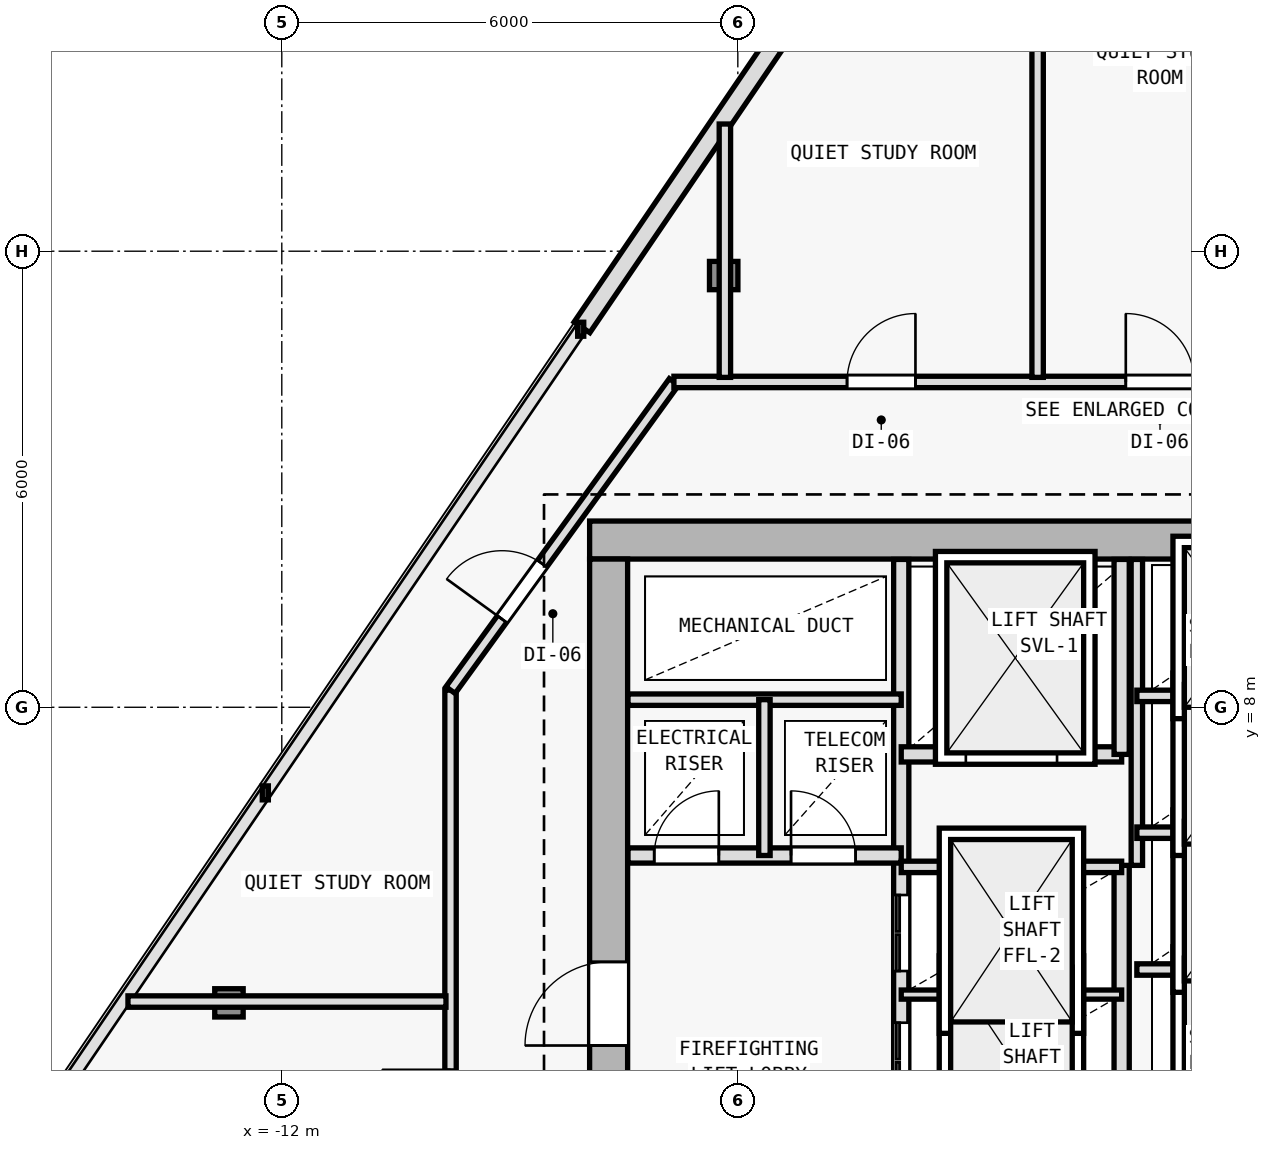
"""IFC4 building model, lengths in metres.
Left out: names, types, materials, properties, quantities, classifications, styles, units other than length and angle.
Written with IfcOpenShell. Run it as: python <this file> out.ifc"""

import sys

from ifc_helpers import new_model, si_unit, direction, frame, frame_2d, origin, origin_2d, place, context, subcontext, project, spatial, rectangle, i_section, extrude, element, fill, save


model = new_model("IFC4")
c1 = context("Model", 3, precision=1e-05, world=origin(), true_north=direction((0.0, 1.0)))
c2 = subcontext(c1, "Body", "Model", "MODEL_VIEW")
j1 = project(units=[si_unit("LENGTHUNIT", "METRE"), si_unit("PLANEANGLEUNIT", "RADIAN")], contexts=[c1])
p1 = place(None, origin())
s1 = spatial("IfcSite", under=j1, at=p1, CompositionType="ELEMENT")
p2 = place(p1, origin())
s2 = spatial("IfcBuilding", under=s1, at=p2, CompositionType="ELEMENT")
p3 = place(p2, frame((0.0, 0.0, 237.9)))
s3 = spatial("IfcBuildingStorey", under=s2, at=p3, CompositionType="ELEMENT", Elevation=237.9)
p4 = place(p3, frame((-7.7, 10.2, 0.0), z_axis=(0.0, 0.0, 1.0), x_axis=(1.0, 0.0, 0.0)))
e1 = element("IfcColumn", 1, at=p4, inside=s3, PredefinedType="COLUMN", context=c2, shape_type="SweptSolid", body=[
    extrude(i_section(OverallWidth=0.398, OverallDepth=0.387, WebThickness=0.013, FlangeThickness=0.022, FilletRadius=0.015, at=origin_2d()), origin(), (0.0, 0.0, 1.0), 3.6),
])
p5 = place(p3, frame((-6.186, 13.68, 0.006), z_axis=(0.008843163607, -0.002516900411, 0.999957730942), x_axis=(0.273743828055, 0.961802639112, 0.0)))
e2 = element("IfcColumn", 2, at=p5, inside=s3, PredefinedType="COLUMN", context=c2, shape_type="SweptSolid", body=[
    extrude(i_section(OverallWidth=0.374, OverallDepth=0.372, WebThickness=0.012, FlangeThickness=0.02, FilletRadius=0.015, at=origin_2d()), origin(), (0.0, 0.0, 1.0), 3.589),
])
p6 = place(p3, frame((-12.695, 4.111, 0.006), z_axis=(0.017003561856, 0.009590008887, 0.99980943715), x_axis=(-0.491253415567, 0.871016694268, 0.0)))
e3 = element("IfcColumn", 3, at=p6, inside=s3, PredefinedType="COLUMN", context=c2, shape_type="SweptSolid", body=[
    extrude(i_section(OverallWidth=0.374, OverallDepth=0.372, WebThickness=0.012, FlangeThickness=0.02, FilletRadius=0.015, at=origin_2d()), origin(), (0.0, 0.0, 1.0), 3.59),
])
p7 = place(p3, frame((-8.05, 12.998, 0.0), z_axis=(0.0, 0.0, 1.0), x_axis=(0.562447281182, 0.826833148762, 0.0)))
e4 = element("IfcWall", 4, at=p7, inside=s3, PredefinedType="SOLIDWALL", context=c2, shape_type="SweptSolid", body=[
    extrude(rectangle(XDim=10.411, YDim=0.25, at=frame_2d((5.205, 0.0))), origin(), (0.0, 0.0, 1.0), 3.28),
])
p8 = place(p7, frame((4.455, 0.0, 0.62)))
e5 = element("IfcOpeningElement", 5, at=p8, cuts=e4, PredefinedType="OPENING", context=c2, shape_type="SweptSolid", body=[
    extrude(rectangle(XDim=1.5, YDim=2.0, at=frame_2d((0.75, 1.0))), frame((0.0, 0.135, 0.0), z_axis=(0.0, -1.0, 0.0), x_axis=(1.0, 0.0, 0.0)), (0.0, 0.0, 1.0), 0.27),
])
p9 = place(p3, frame((7.95, 10.2, 0.0), z_axis=(0.0, 0.0, 1.0), x_axis=(-1.0, 0.0, 0.0)))
e6 = element("IfcWall", 6, at=p9, inside=s3, PredefinedType="SHEAR", context=c2, shape_type="SweptSolid", body=[
    extrude(rectangle(XDim=15.9, YDim=0.5, at=frame_2d((7.95, 0.0))), origin(), (0.0, 0.0, 1.0), 3.28),
])
p10 = place(p9, frame((4.4, 0.0, 0.0)))
e7 = element("IfcOpeningElement", 7, at=p10, cuts=e6, PredefinedType="OPENING", context=c2, shape_type="SweptSolid", body=[
    extrude(rectangle(XDim=1.1, YDim=2.15, at=frame_2d((0.55, 1.075))), frame((0.0, 0.26, 0.0), z_axis=(0.0, -1.0, 0.0), x_axis=(1.0, 0.0, 0.0)), (0.0, 0.0, 1.0), 0.52),
])
p11 = place(p3, frame((-7.7, -9.15, 0.0), z_axis=(0.0, 0.0, 1.0), x_axis=(0.0, 1.0, 0.0)))
e8 = element("IfcWall", 8, at=p11, inside=s3, PredefinedType="SHEAR", context=c2, shape_type="SweptSolid", body=[
    extrude(rectangle(XDim=19.1, YDim=0.5, at=frame_2d((9.55, 0.0))), origin(), (0.0, 0.0, 1.0), 3.28),
])
p12 = place(p11, frame((12.7, 0.0, 0.0)))
e9 = element("IfcOpeningElement", 9, at=p12, cuts=e8, PredefinedType="OPENING", context=c2, shape_type="SweptSolid", body=[
    extrude(rectangle(XDim=1.1, YDim=2.15, at=frame_2d((0.55, 1.075))), frame((0.0, 0.26, 0.0), z_axis=(0.0, -1.0, 0.0), x_axis=(1.0, 0.0, 0.0)), (0.0, 0.0, 1.0), 0.52),
])
p13 = place(p3, frame((-3.85, 1.35, 0.0), z_axis=(0.0, 0.0, 1.0), x_axis=(0.0, 1.0, 0.0)))
e10 = element("IfcWall", 10, at=p13, inside=s3, PredefinedType="SOLIDWALL", context=c2, shape_type="SweptSolid", body=[
    extrude(rectangle(XDim=8.595, YDim=0.2, at=frame_2d((4.297, 0.0))), origin(), (0.0, 0.0, 1.0), 3.28),
])
p14 = place(p13, frame((1.5, 0.0, 0.0)))
e11 = element("IfcOpeningElement", 11, at=p14, cuts=e10, PredefinedType="OPENING", context=c2, shape_type="SweptSolid", body=[
    extrude(rectangle(XDim=1.0, YDim=2.15, at=frame_2d((0.5, 1.075))), frame((0.0, 0.11, 0.0), z_axis=(0.0, -1.0, 0.0), x_axis=(1.0, 0.0, 0.0)), (0.0, 0.0, 1.0), 0.22),
])
p15 = place(p13, frame((3.18, 0.0, 0.0)))
e12 = element("IfcOpeningElement", 12, at=p15, cuts=e10, PredefinedType="OPENING", context=c2, shape_type="SweptSolid", body=[
    extrude(rectangle(XDim=1.0, YDim=2.15, at=frame_2d((0.5, 1.075))), frame((0.0, 0.11, 0.0), z_axis=(0.0, -1.0, 0.0), x_axis=(1.0, 0.0, 0.0)), (0.0, 0.0, 1.0), 0.22),
])
p16 = place(p3, frame((-7.445, 6.05, 0.0), z_axis=(0.0, 0.0, 1.0), x_axis=(1.0, 0.0, 0.0)))
e13 = element("IfcWall", 13, at=p16, inside=s3, PredefinedType="SOLIDWALL", context=c2, shape_type="SweptSolid", body=[
    extrude(rectangle(XDim=3.595, YDim=0.2, at=frame_2d((1.797, 0.0))), origin(), (0.0, 0.0, 1.0), 3.28),
])
p17 = place(p16, frame((0.345, 0.0, 0.0)))
e14 = element("IfcOpeningElement", 14, at=p17, cuts=e13, PredefinedType="OPENING", context=c2, shape_type="SweptSolid", body=[
    extrude(rectangle(XDim=0.85, YDim=2.1, at=frame_2d((0.425, 1.05))), frame((0.0, 0.11, 0.0), z_axis=(0.0, -1.0, 0.0), x_axis=(1.0, 0.0, 0.0)), (0.0, 0.0, 1.0), 0.22),
])
p18 = place(p16, frame((2.145, 0.0, 0.0)))
e15 = element("IfcOpeningElement", 15, at=p18, cuts=e13, PredefinedType="OPENING", context=c2, shape_type="SweptSolid", body=[
    extrude(rectangle(XDim=0.85, YDim=2.1, at=frame_2d((0.425, 1.05))), frame((0.0, 0.11, 0.0), z_axis=(0.0, -1.0, 0.0), x_axis=(1.0, 0.0, 0.0)), (0.0, 0.0, 1.0), 0.22),
])
p19 = place(p3, frame((-7.445, 8.1, 0.0), z_axis=(0.0, 0.0, 1.0), x_axis=(1.0, 0.0, 0.0)))
e16 = element("IfcWall", 16, at=p19, inside=s3, PredefinedType="PARTITIONING", context=c2, shape_type="SweptSolid", body=[
    extrude(rectangle(XDim=3.595, YDim=0.15, at=frame_2d((1.797, 0.0))), origin(), (0.0, 0.0, 1.0), 3.28),
])
p20 = place(p3, frame((-5.65, 6.05, 0.0), z_axis=(0.0, 0.0, 1.0), x_axis=(0.0, 1.0, 0.0)))
e17 = element("IfcWall", 17, at=p20, inside=s3, PredefinedType="PARTITIONING", context=c2, shape_type="SweptSolid", body=[
    extrude(rectangle(XDim=2.05, YDim=0.15, at=frame_2d((1.025, 0.0))), origin(), (0.0, 0.0, 1.0), 3.28),
])
p21 = place(p3, frame((-0.95, 2.65, 0.0), z_axis=(0.0, 0.0, 1.0), x_axis=(0.0, 1.0, 0.0)))
e18 = element("IfcWall", 18, at=p21, inside=s3, PredefinedType="SOLIDWALL", context=c2, shape_type="SweptSolid", body=[
    extrude(rectangle(XDim=3.27, YDim=0.2, at=frame_2d((1.635, 0.0))), origin(), (0.0, 0.0, 1.0), 3.28),
])
p22 = place(p3, frame((-3.85, 4.22, 0.0), z_axis=(0.0, 0.0, 1.0), x_axis=(1.0, 0.0, 0.0)))
e19 = element("IfcWall", 19, at=p22, inside=s3, PredefinedType="PARTITIONING", context=c2, shape_type="SweptSolid", body=[
    extrude(rectangle(XDim=2.9, YDim=0.12, at=frame_2d((1.45, 0.0))), origin(), (0.0, 0.0, 1.0), 3.28),
])
p23 = place(p3, frame((-3.85, 5.9, 0.0), z_axis=(0.0, 0.0, 1.0), x_axis=(1.0, 0.0, 0.0)))
e20 = element("IfcWall", 20, at=p23, inside=s3, PredefinedType="PARTITIONING", context=c2, shape_type="SweptSolid", body=[
    extrude(rectangle(XDim=2.9, YDim=0.15, at=frame_2d((1.45, 0.0))), origin(), (0.0, 0.0, 1.0), 3.28),
])
p24 = place(p3, frame((-3.85, 7.38, 0.0), z_axis=(0.0, 0.0, 1.0), x_axis=(1.0, 0.0, 0.0)))
e21 = element("IfcWall", 21, at=p24, inside=s3, PredefinedType="SOLIDWALL", context=c2, shape_type="SweptSolid", body=[
    extrude(rectangle(XDim=2.9, YDim=0.2, at=frame_2d((1.45, 0.0))), origin(), (0.0, 0.0, 1.0), 3.28),
])
p25 = place(p24, frame((0.85, 0.0, 0.0)))
e22 = element("IfcOpeningElement", 22, at=p25, cuts=e21, PredefinedType="OPENING", context=c2, shape_type="SweptSolid", body=[
    extrude(rectangle(XDim=1.2, YDim=2.2, at=frame_2d((0.6, 1.1))), frame((0.0, 0.11, 0.0), z_axis=(0.0, -1.0, 0.0), x_axis=(1.0, 0.0, 0.0)), (0.0, 0.0, 1.0), 0.22),
])
p26 = place(p3, frame((-0.95, 7.38, 0.0), z_axis=(0.0, 0.0, 1.0), x_axis=(0.0, 1.0, 0.0)))
e23 = element("IfcWall", 23, at=p26, inside=s3, PredefinedType="SOLIDWALL", context=c2, shape_type="SweptSolid", body=[
    extrude(rectangle(XDim=2.565, YDim=0.2, at=frame_2d((1.283, 0.0))), origin(), (0.0, 0.0, 1.0), 3.28),
])
p27 = place(p3, frame((-0.75, 5.92, 0.0), z_axis=(0.0, 0.0, 1.0), x_axis=(0.0, 1.0, 0.0)))
e24 = element("IfcWall", 24, at=p27, inside=s3, PredefinedType="PARTITIONING", context=c2, shape_type="SweptSolid", body=[
    extrude(rectangle(XDim=4.025, YDim=0.15, at=frame_2d((2.013, 0.0))), origin(), (0.0, 0.0, 1.0), 3.28),
])
for number, where, z_axis, x_axis in (
    (25, (-0.75, 4.55, 0.0), (0.0, 0.0, 1.0), (1.0, 0.0, 0.0)),
    (26, (-0.75, 6.35, 0.0), (0.0, 0.0, 1.0), (1.0, 0.0, 0.0)),
    (27, (-0.75, 8.15, 0.0), (0.0, 0.0, 1.0), (1.0, 0.0, 0.0)),
):
    element("IfcWall", number, at=place(p3, frame(where, z_axis=z_axis, x_axis=x_axis)), inside=s3, PredefinedType="PARTITIONING", context=c2, shape_type="SweptSolid", body=[
        extrude(rectangle(XDim=2.7, YDim=0.15, at=frame_2d((1.35, 0.0))), origin(), (0.0, 0.0, 1.0), 3.28),
    ])
p28 = place(p3, frame((-9.78, -11.48, 0.0), z_axis=(0.0, 0.0, 1.0), x_axis=(0.0, 1.0, 0.0)))
e28 = element("IfcWall", 28, at=p28, inside=s3, PredefinedType="PARTITIONING", context=c2, shape_type="SweptSolid", body=[
    extrude(rectangle(XDim=19.706, YDim=0.15, at=frame_2d((9.853, 0.0))), origin(), (0.0, 0.0, 1.0), 2.755),
])
p29 = place(p28, frame((9.301, 0.0, 0.0)))
e29 = element("IfcOpeningElement", 29, at=p29, cuts=e28, PredefinedType="OPENING", context=c2, shape_type="SweptSolid", body=[
    extrude(rectangle(XDim=0.9, YDim=2.1, at=frame_2d((0.45, 1.05))), frame((0.0, 0.085, 0.0), z_axis=(0.0, -1.0, 0.0), x_axis=(1.0, 0.0, 0.0)), (0.0, 0.0, 1.0), 0.17),
])
p30 = place(p28, frame((6.871, 0.0, 0.0)))
e30 = element("IfcOpeningElement", 30, at=p30, cuts=e28, PredefinedType="OPENING", context=c2, shape_type="SweptSolid", body=[
    extrude(rectangle(XDim=0.9, YDim=2.1, at=frame_2d((0.45, 1.05))), frame((0.0, 0.085, 0.0), z_axis=(0.0, -1.0, 0.0), x_axis=(1.0, 0.0, 0.0)), (0.0, 0.0, 1.0), 0.17),
])
p31 = place(p28, frame((4.594, 0.0, 0.0)))
e31 = element("IfcOpeningElement", 31, at=p31, cuts=e28, PredefinedType="OPENING", context=c2, shape_type="SweptSolid", body=[
    extrude(rectangle(XDim=0.9, YDim=2.1, at=frame_2d((0.45, 1.05))), frame((0.0, 0.085, 0.0), z_axis=(0.0, -1.0, 0.0), x_axis=(1.0, 0.0, 0.0)), (0.0, 0.0, 1.0), 0.17),
])
p32 = place(p28, frame((2.913, 0.0, 0.0)))
e32 = element("IfcOpeningElement", 32, at=p32, cuts=e28, PredefinedType="OPENING", context=c2, shape_type="SweptSolid", body=[
    extrude(rectangle(XDim=0.85, YDim=2.1, at=frame_2d((0.425, 1.05))), frame((0.0, 0.085, 0.0), z_axis=(0.0, -1.0, 0.0), x_axis=(1.0, 0.0, 0.0)), (0.0, 0.0, 1.0), 0.17),
])
p33 = place(p28, frame((0.988, 0.0, 0.0)))
e33 = element("IfcOpeningElement", 33, at=p33, cuts=e28, PredefinedType="OPENING", context=c2, shape_type="SweptSolid", body=[
    extrude(rectangle(XDim=0.9, YDim=2.1, at=frame_2d((0.45, 1.05))), frame((0.0, 0.085, 0.0), z_axis=(0.0, -1.0, 0.0), x_axis=(1.0, 0.0, 0.0)), (0.0, 0.0, 1.0), 0.17),
])
p34 = place(p28, frame((13.81, 0.0, 0.0)))
e34 = element("IfcOpeningElement", 34, at=p34, cuts=e28, PredefinedType="OPENING", context=c2, shape_type="SweptSolid", body=[
    extrude(rectangle(XDim=0.9, YDim=2.1, at=frame_2d((0.45, 1.05))), frame((0.0, 0.085, 0.0), z_axis=(0.0, -1.0, 0.0), x_axis=(1.0, 0.0, 0.0)), (0.0, 0.0, 1.0), 0.17),
])
p35 = place(p28, frame((11.468, 0.0, 0.0)))
e35 = element("IfcOpeningElement", 35, at=p35, cuts=e28, PredefinedType="OPENING", context=c2, shape_type="SweptSolid", body=[
    extrude(rectangle(XDim=0.9, YDim=2.1, at=frame_2d((0.45, 1.05))), frame((0.0, 0.085, 0.0), z_axis=(0.0, -1.0, 0.0), x_axis=(1.0, 0.0, 0.0)), (0.0, 0.0, 1.0), 0.17),
])
p36 = place(p3, frame((-9.78, 8.226, 0.0), z_axis=(0.0, 0.0, 1.0), x_axis=(0.586956386413, 0.809618552436, 0.0)))
e36 = element("IfcWall", 36, at=p36, inside=s3, PredefinedType="PARTITIONING", context=c2, shape_type="SweptSolid", body=[
    extrude(rectangle(XDim=5.008, YDim=0.15, at=frame_2d((2.504, 0.0))), origin(), (0.0, 0.0, 1.0), 2.905),
])
p37 = place(p36, frame((1.154, 0.0, 0.0)))
e37 = element("IfcOpeningElement", 37, at=p37, cuts=e36, PredefinedType="OPENING", context=c2, shape_type="SweptSolid", body=[
    extrude(rectangle(XDim=0.9, YDim=2.1, at=frame_2d((0.45, 1.05))), frame((0.0, 0.085, 0.0), z_axis=(0.0, -1.0, 0.0), x_axis=(1.0, 0.0, 0.0)), (0.0, 0.0, 1.0), 0.17),
])
p38 = place(p3, frame((-6.841, 12.28, 0.0), z_axis=(0.0, 0.0, 1.0), x_axis=(1.0, 0.0, 0.0)))
e38 = element("IfcWall", 38, at=p38, inside=s3, PredefinedType="PARTITIONING", context=c2, shape_type="SweptSolid", body=[
    extrude(rectangle(XDim=13.682, YDim=0.15, at=frame_2d((6.841, 0.0))), origin(), (0.0, 0.0, 1.0), 2.905),
])
p39 = place(p38, frame((12.421, 0.0, 0.0)))
e39 = element("IfcOpeningElement", 39, at=p39, cuts=e38, PredefinedType="OPENING", context=c2, shape_type="SweptSolid", body=[
    extrude(rectangle(XDim=0.85, YDim=2.1, at=frame_2d((0.425, 1.05))), frame((0.0, 0.085, 0.0), z_axis=(0.0, -1.0, 0.0), x_axis=(1.0, 0.0, 0.0)), (0.0, 0.0, 1.0), 0.17),
])
p40 = place(p38, frame((9.672, 0.0, 0.0)))
e40 = element("IfcOpeningElement", 40, at=p40, cuts=e38, PredefinedType="OPENING", context=c2, shape_type="SweptSolid", body=[
    extrude(rectangle(XDim=0.9, YDim=2.1, at=frame_2d((0.45, 1.05))), frame((0.0, 0.085, 0.0), z_axis=(0.0, -1.0, 0.0), x_axis=(1.0, 0.0, 0.0)), (0.0, 0.0, 1.0), 0.17),
])
p41 = place(p38, frame((5.945, 0.0, 0.0)))
e41 = element("IfcOpeningElement", 41, at=p41, cuts=e38, PredefinedType="OPENING", context=c2, shape_type="SweptSolid", body=[
    extrude(rectangle(XDim=0.9, YDim=2.1, at=frame_2d((0.45, 1.05))), frame((0.0, 0.085, 0.0), z_axis=(0.0, -1.0, 0.0), x_axis=(1.0, 0.0, 0.0)), (0.0, 0.0, 1.0), 0.17),
])
p42 = place(p38, frame((2.278, 0.0, 0.0)))
e42 = element("IfcOpeningElement", 42, at=p42, cuts=e38, PredefinedType="OPENING", context=c2, shape_type="SweptSolid", body=[
    extrude(rectangle(XDim=0.9, YDim=2.1, at=frame_2d((0.45, 1.05))), frame((0.0, 0.085, 0.0), z_axis=(0.0, -1.0, 0.0), x_axis=(1.0, 0.0, 0.0)), (0.0, 0.0, 1.0), 0.17),
])
p43 = place(p3, frame((-6.17, 12.34, 0.0), z_axis=(0.0, 0.0, 1.0), x_axis=(0.0, 1.0, 0.0)))
e43 = element("IfcWall", 43, at=p43, inside=s3, PredefinedType="PARTITIONING", context=c2, shape_type="SweptSolid", body=[
    extrude(rectangle(XDim=3.333, YDim=0.15, at=frame_2d((1.667, 0.0))), origin(), (0.0, 0.0, 1.0), 2.905),
])
p44 = place(p3, frame((-9.84, 4.128, 0.0), z_axis=(0.0, 0.0, 1.0), x_axis=(-1.0, 0.0, 0.0)))
e44 = element("IfcWall", 44, at=p44, inside=s3, PredefinedType="PARTITIONING", context=c2, shape_type="SweptSolid", body=[
    extrude(rectangle(XDim=4.184, YDim=0.15, at=frame_2d((2.092, 0.0))), origin(), (0.0, 0.0, 1.0), 2.905),
])
p45 = place(p3, frame((-2.056, 12.34, 0.0), z_axis=(0.0, 0.0, 1.0), x_axis=(0.0, 1.0, 0.0)))
e45 = element("IfcWall", 45, at=p45, inside=s3, PredefinedType="PARTITIONING", context=c2, shape_type="SweptSolid", body=[
    extrude(rectangle(XDim=9.251, YDim=0.15, at=frame_2d((4.625, 0.0))), origin(), (0.0, 0.0, 1.0), 2.905),
])
p46 = place(p12, origin())
e46 = element("IfcDoor", 46, at=p46, inside=s3, OperationType="SINGLE_SWING_LEFT", PredefinedType="DOOR", context=c2, shape_type="SweptSolid", body=[
    extrude(rectangle(XDim=1.1, YDim=2.15, at=frame_2d((0.55, 1.075))), frame((0.0, 0.025, 0.0), z_axis=(0.0, -1.0, 0.0), x_axis=(1.0, 0.0, 0.0)), (0.0, 0.0, 1.0), 0.05),
])
fill(e9, e46)
p47 = place(p17, origin())
e47 = element("IfcDoor", 47, at=p47, inside=s3, OperationType="SINGLE_SWING_RIGHT", PredefinedType="DOOR", context=c2, shape_type="SweptSolid", body=[
    extrude(rectangle(XDim=0.85, YDim=2.1, at=frame_2d((0.425, 1.05))), frame((0.0, 0.025, 0.0), z_axis=(0.0, -1.0, 0.0), x_axis=(1.0, 0.0, 0.0)), (0.0, 0.0, 1.0), 0.05),
])
fill(e14, e47)
p48 = place(p18, origin())
e48 = element("IfcDoor", 48, at=p48, inside=s3, OperationType="SINGLE_SWING_LEFT", PredefinedType="DOOR", context=c2, shape_type="SweptSolid", body=[
    extrude(rectangle(XDim=0.85, YDim=2.1, at=frame_2d((0.425, 1.05))), frame((0.0, 0.025, 0.0), z_axis=(0.0, -1.0, 0.0), x_axis=(1.0, 0.0, 0.0)), (0.0, 0.0, 1.0), 0.05),
])
fill(e15, e48)
p49 = place(p25, origin())
e49 = element("IfcDoor", 49, at=p49, inside=s3, OperationType="DOUBLE_DOOR_SLIDING", PredefinedType="DOOR", context=c2, shape_type="SweptSolid", body=[
    extrude(rectangle(XDim=1.2, YDim=2.2, at=frame_2d((0.6, 1.1))), frame((0.0, 0.025, 0.0), z_axis=(0.0, -1.0, 0.0), x_axis=(1.0, 0.0, 0.0)), (0.0, 0.0, 1.0), 0.05),
])
fill(e22, e49)
p50 = place(p14, origin())
e50 = element("IfcDoor", 50, at=p50, inside=s3, OperationType="DOUBLE_DOOR_SLIDING", PredefinedType="DOOR", context=c2, shape_type="SweptSolid", body=[
    extrude(rectangle(XDim=1.0, YDim=2.15, at=frame_2d((0.5, 1.075))), frame((0.0, 0.025, 0.0), z_axis=(0.0, -1.0, 0.0), x_axis=(1.0, 0.0, 0.0)), (0.0, 0.0, 1.0), 0.05),
])
fill(e11, e50)
p51 = place(p15, origin())
e51 = element("IfcDoor", 51, at=p51, inside=s3, OperationType="DOUBLE_DOOR_SLIDING", PredefinedType="DOOR", context=c2, shape_type="SweptSolid", body=[
    extrude(rectangle(XDim=1.0, YDim=2.15, at=frame_2d((0.5, 1.075))), frame((0.0, 0.025, 0.0), z_axis=(0.0, -1.0, 0.0), x_axis=(1.0, 0.0, 0.0)), (0.0, 0.0, 1.0), 0.05),
])
fill(e12, e51)
p52 = place(p41, origin())
e52 = element("IfcDoor", 52, at=p52, inside=s3, OperationType="SINGLE_SWING_LEFT", PredefinedType="DOOR", context=c2, shape_type="SweptSolid", body=[
    extrude(rectangle(XDim=0.9, YDim=2.1, at=frame_2d((0.45, 1.05))), frame((0.0, 0.025, 0.0), z_axis=(0.0, -1.0, 0.0), x_axis=(1.0, 0.0, 0.0)), (0.0, 0.0, 1.0), 0.05),
])
fill(e41, e52)
p53 = place(p42, origin())
e53 = element("IfcDoor", 53, at=p53, inside=s3, OperationType="SINGLE_SWING_RIGHT", PredefinedType="DOOR", context=c2, shape_type="SweptSolid", body=[
    extrude(rectangle(XDim=0.9, YDim=2.1, at=frame_2d((0.45, 1.05))), frame((0.0, 0.025, 0.0), z_axis=(0.0, -1.0, 0.0), x_axis=(1.0, 0.0, 0.0)), (0.0, 0.0, 1.0), 0.05),
])
fill(e42, e53)
p54 = place(p37, origin())
e54 = element("IfcDoor", 54, at=p54, inside=s3, OperationType="SINGLE_SWING_LEFT", PredefinedType="DOOR", context=c2, shape_type="SweptSolid", body=[
    extrude(rectangle(XDim=0.9, YDim=2.1, at=frame_2d((0.45, 1.05))), frame((0.0, 0.025, 0.0), z_axis=(0.0, -1.0, 0.0), x_axis=(1.0, 0.0, 0.0)), (0.0, 0.0, 1.0), 0.05),
])
fill(e37, e54)
p55 = place(p34, origin())
e55 = element("IfcDoor", 55, at=p55, inside=s3, OperationType="SINGLE_SWING_RIGHT", PredefinedType="DOOR", context=c2, shape_type="SweptSolid", body=[
    extrude(rectangle(XDim=0.9, YDim=2.1, at=frame_2d((0.45, 1.05))), frame((0.0, 0.025, 0.0), z_axis=(0.0, -1.0, 0.0), x_axis=(1.0, 0.0, 0.0)), (0.0, 0.0, 1.0), 0.05),
])
fill(e34, e55)
save(model, sys.argv[1])
